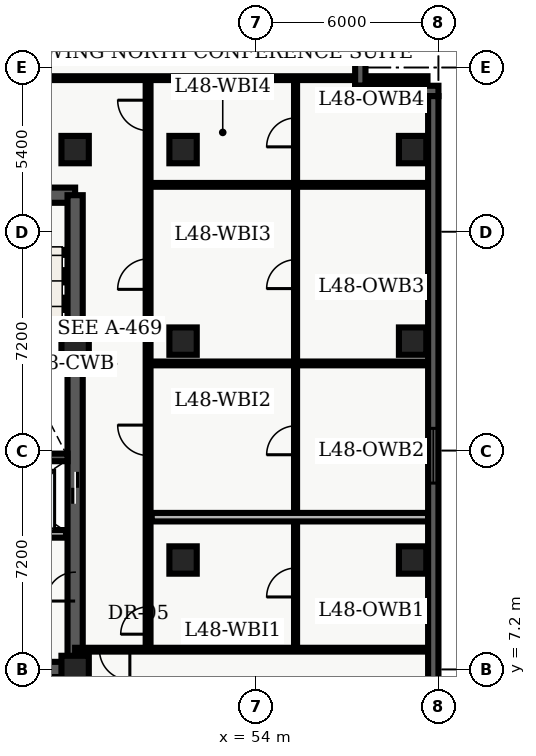
"""IFC4 building model, lengths in metres.
Left out: names, types, materials, properties, quantities, classifications, styles, units other than length and angle.
Written with IfcOpenShell. Run it as: python <this file> out.ifc"""

import sys

from ifc_helpers import new_model, entity, si_unit, converted_unit, direction, frame, origin_with_axes, origin_2d_with_axis, place, context, subcontext, project, spatial, polyline, rectangle, outline, extrude, element, fill, save


model = new_model("IFC4")
c1 = context("Model", 3, precision=1e-05, world=origin_with_axes(), true_north=direction((0.0, 1.0)))
c2 = subcontext(c1, "Body", "Model", "MODEL_VIEW")
j1 = project(units=[si_unit("LENGTHUNIT", "METRE"), converted_unit("PLANEANGLEUNIT", "DEGREE", entity("IfcPlaneAngleMeasure", 0.017), si_unit("PLANEANGLEUNIT", "RADIAN"), dimensions=[0, 0, 0, 0, 0, 0, 0])], contexts=[c1])
p1 = place(None, origin_with_axes())
s1 = spatial("IfcSite", under=j1, at=p1, CompositionType="ELEMENT")
p2 = place(p1, origin_with_axes())
s2 = spatial("IfcBuilding", under=s1, at=p2, CompositionType="ELEMENT")
p3 = place(p2, frame((0.0, 0.0, 196.5), z_axis=(0.0, 0.0, 1.0), x_axis=(1.0, 0.0, 0.0)))
s3 = spatial("IfcBuildingStorey", under=s2, at=p3, CompositionType="ELEMENT", Elevation=196.5)
p4 = place(p3, frame((40.2, 7.2, 0.0), z_axis=(0.0, 0.0, 1.0), x_axis=(1.0, 0.0, 0.0)))
e1 = element("IfcWall", 1, at=p4, inside=s3, PredefinedType="SHEAR", context=c2, shape_type="SweptSolid", body=[
    extrude(outline(polyline([(0.0, -0.25), (7.85, -0.25), (7.85, 0.25), (0.0, 0.25), (0.0, -0.25)])), origin_with_axes(), (0.0, 0.0, 1.0), 3.66),
])
p5 = place(p4, frame((2.175, 0.0, 0.0), z_axis=(0.0, 0.0, 1.0), x_axis=(1.0, 0.0, 0.0)))
e2 = element("IfcOpeningElement", 2, at=p5, cuts=e1, PredefinedType="OPENING", context=c2, shape_type="SweptSolid", body=[
    extrude(rectangle(XDim=1.05, YDim=0.52, at=origin_2d_with_axis()), origin_with_axes(), (0.0, 0.0, 1.0), 2.15),
])
p6 = place(p3, frame((40.2, 22.8, 0.0), z_axis=(0.0, 0.0, 1.0), x_axis=(1.0, 0.0, 0.0)))
e3 = element("IfcWall", 3, at=p6, inside=s3, PredefinedType="SHEAR", context=c2, shape_type="SweptSolid", body=[
    extrude(outline(polyline([(0.0, -0.25), (7.85, -0.25), (7.85, 0.25), (0.0, 0.25), (0.0, -0.25)])), origin_with_axes(), (0.0, 0.0, 1.0), 3.66),
])
p7 = place(p6, frame((5.775, 0.0, 0.0), z_axis=(0.0, 0.0, 1.0), x_axis=(1.0, 0.0, 0.0)))
e4 = element("IfcOpeningElement", 4, at=p7, cuts=e3, PredefinedType="OPENING", context=c2, shape_type="SweptSolid", body=[
    extrude(rectangle(XDim=1.05, YDim=0.52, at=origin_2d_with_axis()), origin_with_axes(), (0.0, 0.0, 1.0), 2.15),
])
p8 = place(p3, frame((48.05, 7.2, 0.0), z_axis=(0.0, 0.0, 1.0), x_axis=(0.0, 1.0, 0.0)))
e5 = element("IfcWall", 5, at=p8, inside=s3, PredefinedType="SHEAR", context=c2, shape_type="SweptSolid", body=[
    extrude(outline(polyline([(0.0, -0.25), (15.6, -0.25), (15.6, 0.25), (0.0, 0.25), (0.0, -0.25)])), origin_with_axes(), (0.0, 0.0, 1.0), 3.66),
])
p9 = place(p8, frame((5.975, 0.0, 0.0), z_axis=(0.0, 0.0, 1.0), x_axis=(1.0, 0.0, 0.0)))
e6 = element("IfcOpeningElement", 6, at=p9, cuts=e5, PredefinedType="OPENING", context=c2, shape_type="SweptSolid", body=[
    extrude(rectangle(XDim=1.05, YDim=0.52, at=origin_2d_with_axis()), origin_with_axes(), (0.0, 0.0, 1.0), 2.15),
])
p10 = place(p8, frame((2.725, 0.0, 0.0), z_axis=(0.0, 0.0, 1.0), x_axis=(1.0, 0.0, 0.0)))
e7 = element("IfcOpeningElement", 7, at=p10, cuts=e5, PredefinedType="OPENING", context=c2, shape_type="SweptSolid", body=[
    extrude(rectangle(XDim=0.95, YDim=0.52, at=origin_2d_with_axis()), origin_with_axes(), (0.0, 0.0, 1.0), 2.15),
])
p11 = place(p3, frame((44.25, 14.175, 0.0), z_axis=(0.0, 0.0, 1.0), x_axis=(1.0, 0.0, 0.0)))
e8 = element("IfcWall", 8, at=p11, inside=s3, PredefinedType="SHEAR", context=c2, shape_type="SweptSolid", body=[
    extrude(outline(polyline([(0.0, -0.125), (3.55, -0.125), (3.55, 0.125), (0.0, 0.125), (0.0, -0.125)])), origin_with_axes(), (0.0, 0.0, 1.0), 3.66),
])
for number, where, z_axis, x_axis in (
    (9, (48.05, 7.2, 0.0), (0.0, 0.0, 1.0), (1.0, 0.0, 0.0)),
    (10, (48.05, 18.0, 0.0), (0.0, 0.0, 1.0), (1.0, 0.0, 0.0)),
    (11, (48.05, 24.3, 0.0), (0.0, 0.0, 1.0), (1.0, 0.0, 0.0)),
    (12, (51.6, 10.8, 0.0), (0.0, 0.0, 1.0), (1.0, 0.0, 0.0)),
    (13, (51.6, 18.0, 0.0), (0.0, 0.0, 1.0), (1.0, 0.0, 0.0)),
    (14, (51.6, 24.3, 0.0), (0.0, 0.0, 1.0), (1.0, 0.0, 0.0)),
    (15, (59.15, 10.8, 0.0), (0.0, 0.0, 1.0), (1.0, 0.0, 0.0)),
    (16, (59.15, 18.0, 0.0), (0.0, 0.0, 1.0), (1.0, 0.0, 0.0)),
    (17, (59.15, 24.3, 0.0), (0.0, 0.0, 1.0), (1.0, 0.0, 0.0)),
):
    element("IfcColumn", number, at=place(p3, frame(where, z_axis=z_axis, x_axis=x_axis)), inside=s3, PredefinedType="COLUMN", context=c2, shape_type="SweptSolid", body=[
        extrude(rectangle(XDim=0.9, YDim=0.9, at=origin_2d_with_axis()), origin_with_axes(), (0.0, 0.0, 1.0), 3.9),
    ])
p12 = place(p3, frame((44.25, 11.66, 0.0), z_axis=(0.0, 0.0, 1.0), x_axis=(1.0, 0.0, 0.0)))
e18 = element("IfcWall", 18, at=p12, inside=s3, PredefinedType="SOLIDWALL", context=c2, shape_type="SweptSolid", body=[
    extrude(outline(polyline([(0.0, -0.125), (3.5, -0.125), (3.5, 0.125), (0.0, 0.125), (0.0, -0.125)])), origin_with_axes(), (0.0, 0.0, 1.0), 2.7),
])
p13 = place(p3, frame((50.45, 7.85, 0.0), z_axis=(0.0, 0.0, 1.0), x_axis=(0.0, 1.0, 0.0)))
e19 = element("IfcWall", 19, at=p13, inside=s3, PredefinedType="PARTITIONING", context=c2, shape_type="SweptSolid", body=[
    extrude(outline(polyline([(0.0, -0.08), (18.8, -0.08), (18.8, 0.08), (0.0, 0.08), (0.0, -0.08)])), origin_with_axes(), (0.0, 0.0, 1.0), 2.7),
])
p14 = place(p13, frame((0.96, 0.0, 0.0), z_axis=(0.0, 0.0, 1.0), x_axis=(1.0, 0.0, 0.0)))
e20 = element("IfcOpeningElement", 20, at=p14, cuts=e19, PredefinedType="OPENING", context=c2, shape_type="SweptSolid", body=[
    extrude(rectangle(XDim=0.9, YDim=0.18, at=origin_2d_with_axis()), origin_with_axes(), (0.0, 0.0, 1.0), 2.15),
])
p15 = place(p13, frame((6.888, 0.0, 0.0), z_axis=(0.0, 0.0, 1.0), x_axis=(1.0, 0.0, 0.0)))
e21 = element("IfcOpeningElement", 21, at=p15, cuts=e19, PredefinedType="OPENING", context=c2, shape_type="SweptSolid", body=[
    extrude(rectangle(XDim=1.0, YDim=0.18, at=origin_2d_with_axis()), origin_with_axes(), (0.0, 0.0, 1.0), 2.15),
])
p16 = place(p13, frame((12.353, 0.0, 0.0), z_axis=(0.0, 0.0, 1.0), x_axis=(1.0, 0.0, 0.0)))
e22 = element("IfcOpeningElement", 22, at=p16, cuts=e19, PredefinedType="OPENING", context=c2, shape_type="SweptSolid", body=[
    extrude(rectangle(XDim=1.0, YDim=0.18, at=origin_2d_with_axis()), origin_with_axes(), (0.0, 0.0, 1.0), 2.15),
])
p17 = place(p13, frame((17.575, 0.0, 0.0), z_axis=(0.0, 0.0, 1.0), x_axis=(1.0, 0.0, 0.0)))
e23 = element("IfcOpeningElement", 23, at=p17, cuts=e19, PredefinedType="OPENING", context=c2, shape_type="SweptSolid", body=[
    extrude(rectangle(XDim=1.0, YDim=0.18, at=origin_2d_with_axis()), origin_with_axes(), (0.0, 0.0, 1.0), 2.15),
])
p18 = place(p3, frame((59.665, 7.85, 0.0), z_axis=(0.0, 0.0, 1.0), x_axis=(-1.0, 0.0, 0.0)))
e24 = element("IfcWall", 24, at=p18, inside=s3, PredefinedType="PARTITIONING", context=c2, shape_type="SweptSolid", body=[
    extrude(outline(polyline([(0.0, -0.062), (11.615, -0.062), (11.615, 0.062), (0.0, 0.062), (0.0, -0.062)])), origin_with_axes(), (0.0, 0.0, 1.0), 2.7),
])
p19 = place(p18, frame((10.315, 0.0, 0.0), z_axis=(0.0, 0.0, 1.0), x_axis=(1.0, 0.0, 0.0)))
e25 = element("IfcOpeningElement", 25, at=p19, cuts=e24, PredefinedType="OPENING", context=c2, shape_type="SweptSolid", body=[
    extrude(rectangle(XDim=1.0, YDim=0.145, at=origin_2d_with_axis()), origin_with_axes(), (0.0, 0.0, 1.0), 2.15),
])
p20 = place(p3, frame((38.735, 26.65, 0.0), z_axis=(0.0, 0.0, 1.0), x_axis=(1.0, 0.0, 0.0)))
e26 = element("IfcWall", 26, at=p20, inside=s3, PredefinedType="PARTITIONING", context=c2, shape_type="SweptSolid", body=[
    extrude(outline(polyline([(0.0, -0.062), (20.905, -0.062), (20.905, 0.062), (0.0, 0.062), (0.0, -0.062)])), origin_with_axes(), (0.0, 0.0, 1.0), 2.7),
])
p21 = place(p20, frame((4.265, 0.0, 0.0), z_axis=(0.0, 0.0, 1.0), x_axis=(1.0, 0.0, 0.0)))
e27 = element("IfcOpeningElement", 27, at=p21, cuts=e26, PredefinedType="OPENING", context=c2, shape_type="SweptSolid", body=[
    extrude(rectangle(XDim=1.0, YDim=0.145, at=origin_2d_with_axis()), origin_with_axes(), (0.0, 0.0, 1.0), 2.15),
])
p22 = place(p3, frame((55.3, 7.98, 0.0), z_axis=(0.0, 0.0, 1.0), x_axis=(0.0, 1.0, 0.0)))
e28 = element("IfcWall", 28, at=p22, inside=s3, PredefinedType="PARTITIONING", context=c2, shape_type="SweptSolid", body=[
    extrude(outline(polyline([(0.0, -0.05), (18.54, -0.05), (18.54, 0.05), (0.0, 0.05), (0.0, -0.05)])), origin_with_axes(), (0.0, 0.0, 1.0), 2.7),
])
p23 = place(p22, frame((2.079, 0.0, 0.0), z_axis=(0.0, 0.0, 1.0), x_axis=(1.0, 0.0, 0.0)))
e29 = element("IfcOpeningElement", 29, at=p23, cuts=e28, PredefinedType="OPENING", context=c2, shape_type="SweptSolid", body=[
    extrude(rectangle(XDim=0.95, YDim=0.12, at=origin_2d_with_axis()), origin_with_axes(), (0.0, 0.0, 1.0), 2.15),
])
p24 = place(p22, frame((6.758, 0.0, 0.0), z_axis=(0.0, 0.0, 1.0), x_axis=(1.0, 0.0, 0.0)))
e30 = element("IfcOpeningElement", 30, at=p24, cuts=e28, PredefinedType="OPENING", context=c2, shape_type="SweptSolid", body=[
    extrude(rectangle(XDim=0.95, YDim=0.12, at=origin_2d_with_axis()), origin_with_axes(), (0.0, 0.0, 1.0), 2.15),
])
p25 = place(p22, frame((12.223, 0.0, 0.0), z_axis=(0.0, 0.0, 1.0), x_axis=(1.0, 0.0, 0.0)))
e31 = element("IfcOpeningElement", 31, at=p25, cuts=e28, PredefinedType="OPENING", context=c2, shape_type="SweptSolid", body=[
    extrude(rectangle(XDim=0.95, YDim=0.12, at=origin_2d_with_axis()), origin_with_axes(), (0.0, 0.0, 1.0), 2.15),
])
p26 = place(p22, frame((16.885, 0.0, 0.0), z_axis=(0.0, 0.0, 1.0), x_axis=(1.0, 0.0, 0.0)))
e32 = element("IfcOpeningElement", 32, at=p26, cuts=e28, PredefinedType="OPENING", context=c2, shape_type="SweptSolid", body=[
    extrude(rectangle(XDim=0.95, YDim=0.12, at=origin_2d_with_axis()), origin_with_axes(), (0.0, 0.0, 1.0), 2.15),
])
p27 = place(p3, frame((50.57, 12.209, 0.0), z_axis=(0.0, 0.0, 1.0), x_axis=(1.0, 0.0, 0.0)))
e33 = element("IfcWall", 33, at=p27, inside=s3, PredefinedType="PARTITIONING", context=c2, shape_type="SweptSolid", body=[
    extrude(outline(polyline([(0.0, -0.14), (9.095, -0.14), (9.095, 0.14), (0.0, 0.14), (0.0, -0.14)])), origin_with_axes(), (0.0, 0.0, 1.0), 2.7),
])
for number, where, z_axis, x_axis in (
    (34, (50.57, 17.266, 0.0), (0.0, 0.0, 1.0), (1.0, 0.0, 0.0)),
    (35, (50.57, 23.14, 0.0), (0.0, 0.0, 1.0), (1.0, 0.0, 0.0)),
):
    element("IfcWall", number, at=place(p3, frame(where, z_axis=z_axis, x_axis=x_axis)), inside=s3, PredefinedType="PARTITIONING", context=c2, shape_type="SweptSolid", body=[
        extrude(outline(polyline([(0.0, -0.062), (9.095, -0.062), (9.095, 0.062), (0.0, 0.062), (0.0, -0.062)])), origin_with_axes(), (0.0, 0.0, 1.0), 2.7),
    ])
p28 = place(p3, frame((57.43, 28.46, 0.0), z_axis=(0.0, 0.0, 1.0), x_axis=(0.0, -1.0, 0.0)))
e36 = element("IfcWall", 36, at=p28, inside=s3, PredefinedType="SOLIDWALL", context=c2, shape_type="SweptSolid", body=[
    extrude(outline(polyline([(0.0, -0.17), (2.06, -0.17), (2.06, 0.17), (0.0, 0.17), (0.0, -0.17)])), origin_with_axes(), (0.0, 0.0, 1.0), 3.66),
])
p29 = place(p3, frame((57.26, 26.23, 0.0), z_axis=(0.0, 0.0, 1.0), x_axis=(1.0, 0.0, 0.0)))
e37 = element("IfcWall", 37, at=p29, inside=s3, PredefinedType="SOLIDWALL", context=c2, shape_type="SweptSolid", body=[
    extrude(outline(polyline([(0.0, -0.17), (2.74, -0.17), (2.74, 0.17), (0.0, 0.17), (0.0, -0.17)])), origin_with_axes(), (0.0, 0.0, 1.0), 3.66),
])
p30 = place(p3, frame((59.83, 26.06, 0.0), z_axis=(0.0, 0.0, 1.0), x_axis=(0.0, -1.0, 0.0)))
e38 = element("IfcWall", 38, at=p30, inside=s3, PredefinedType="SOLIDWALL", context=c2, shape_type="SweptSolid", body=[
    extrude(outline(polyline([(0.0, -0.17), (23.66, -0.17), (23.66, 0.17), (0.0, 0.17), (0.0, -0.17)])), origin_with_axes(), (0.0, 0.0, 1.0), 3.66),
])
p31 = place(p30, frame((11.83, 0.0, 0.45), z_axis=(0.0, 0.0, 1.0), x_axis=(1.0, 0.0, 0.0)))
e39 = element("IfcOpeningElement", 39, at=p31, cuts=e38, PredefinedType="OPENING", context=c2, shape_type="SweptSolid", body=[
    extrude(rectangle(XDim=1.8, YDim=0.36, at=origin_2d_with_axis()), origin_with_axes(), (0.0, 0.0, 1.0), 2.1),
])
p32 = place(p30, frame((20.364, 0.0, 0.45), z_axis=(0.0, 0.0, 1.0), x_axis=(1.0, 0.0, 0.0)))
e40 = element("IfcOpeningElement", 40, at=p32, cuts=e38, PredefinedType="OPENING", context=c2, shape_type="SweptSolid", body=[
    extrude(rectangle(XDim=1.8, YDim=0.36, at=origin_2d_with_axis()), origin_with_axes(), (0.0, 0.0, 1.0), 2.1),
])
p33 = place(p8, frame((5.975, 0.0, 0.0), z_axis=(0.0, 0.0, 1.0), x_axis=(1.0, 0.0, 0.0)))
e41 = element("IfcDoor", 41, at=p33, inside=s3, OperationType="SLIDING_TO_LEFT", PredefinedType="DOOR", context=c2, shape_type="SweptSolid", body=[
    extrude(rectangle(XDim=1.05, YDim=0.09, at=origin_2d_with_axis()), origin_with_axes(), (0.0, 0.0, 1.0), 2.15),
])
fill(e6, e41)
p34 = place(p8, frame((2.725, 0.0, 0.0), z_axis=(0.0, 0.0, 1.0), x_axis=(1.0, 0.0, 0.0)))
e42 = element("IfcDoor", 42, at=p34, inside=s3, OperationType="SINGLE_SWING_LEFT", PredefinedType="DOOR", context=c2, shape_type="SweptSolid", body=[
    extrude(rectangle(XDim=0.95, YDim=0.09, at=origin_2d_with_axis()), origin_with_axes(), (0.0, 0.0, 1.0), 2.15),
])
fill(e7, e42)
p35 = place(p18, frame((10.315, 0.0, 0.0), z_axis=(0.0, 0.0, 1.0), x_axis=(1.0, 0.0, 0.0)))
e43 = element("IfcDoor", 43, at=p35, inside=s3, OperationType="SINGLE_SWING_LEFT", PredefinedType="DOOR", context=c2, shape_type="SweptSolid", body=[
    extrude(rectangle(XDim=1.0, YDim=0.075, at=origin_2d_with_axis()), origin_with_axes(), (0.0, 0.0, 1.0), 2.15),
])
fill(e25, e43)
p36 = place(p22, frame((2.079, 0.0, 0.0), z_axis=(0.0, 0.0, 1.0), x_axis=(1.0, 0.0, 0.0)))
e44 = element("IfcDoor", 44, at=p36, inside=s3, OperationType="SINGLE_SWING_LEFT", PredefinedType="DOOR", context=c2, shape_type="SweptSolid", body=[
    extrude(rectangle(XDim=0.95, YDim=0.06, at=origin_2d_with_axis()), origin_with_axes(), (0.0, 0.0, 1.0), 2.15),
])
fill(e29, e44)
p37 = place(p13, frame((0.96, 0.0, 0.0), z_axis=(0.0, 0.0, 1.0), x_axis=(1.0, 0.0, 0.0)))
e45 = element("IfcDoor", 45, at=p37, inside=s3, OperationType="SINGLE_SWING_LEFT", PredefinedType="DOOR", context=c2, shape_type="SweptSolid", body=[
    extrude(rectangle(XDim=0.9, YDim=0.09, at=origin_2d_with_axis()), origin_with_axes(), (0.0, 0.0, 1.0), 2.15),
])
fill(e20, e45)
p38 = place(p22, frame((6.758, 0.0, 0.0), z_axis=(0.0, 0.0, 1.0), x_axis=(1.0, 0.0, 0.0)))
e46 = element("IfcDoor", 46, at=p38, inside=s3, OperationType="SINGLE_SWING_LEFT", PredefinedType="DOOR", context=c2, shape_type="SweptSolid", body=[
    extrude(rectangle(XDim=0.95, YDim=0.06, at=origin_2d_with_axis()), origin_with_axes(), (0.0, 0.0, 1.0), 2.15),
])
fill(e30, e46)
p39 = place(p13, frame((6.888, 0.0, 0.0), z_axis=(0.0, 0.0, 1.0), x_axis=(1.0, 0.0, 0.0)))
e47 = element("IfcDoor", 47, at=p39, inside=s3, OperationType="SINGLE_SWING_RIGHT", PredefinedType="DOOR", context=c2, shape_type="SweptSolid", body=[
    extrude(rectangle(XDim=1.0, YDim=0.09, at=origin_2d_with_axis()), origin_with_axes(), (0.0, 0.0, 1.0), 2.15),
])
fill(e21, e47)
p40 = place(p22, frame((12.223, 0.0, 0.0), z_axis=(0.0, 0.0, 1.0), x_axis=(1.0, 0.0, 0.0)))
e48 = element("IfcDoor", 48, at=p40, inside=s3, OperationType="SINGLE_SWING_LEFT", PredefinedType="DOOR", context=c2, shape_type="SweptSolid", body=[
    extrude(rectangle(XDim=0.95, YDim=0.06, at=origin_2d_with_axis()), origin_with_axes(), (0.0, 0.0, 1.0), 2.15),
])
fill(e31, e48)
p41 = place(p13, frame((12.353, 0.0, 0.0), z_axis=(0.0, 0.0, 1.0), x_axis=(1.0, 0.0, 0.0)))
e49 = element("IfcDoor", 49, at=p41, inside=s3, OperationType="SINGLE_SWING_LEFT", PredefinedType="DOOR", context=c2, shape_type="SweptSolid", body=[
    extrude(rectangle(XDim=1.0, YDim=0.09, at=origin_2d_with_axis()), origin_with_axes(), (0.0, 0.0, 1.0), 2.15),
])
fill(e22, e49)
p42 = place(p22, frame((16.885, 0.0, 0.0), z_axis=(0.0, 0.0, 1.0), x_axis=(1.0, 0.0, 0.0)))
e50 = element("IfcDoor", 50, at=p42, inside=s3, OperationType="SINGLE_SWING_LEFT", PredefinedType="DOOR", context=c2, shape_type="SweptSolid", body=[
    extrude(rectangle(XDim=0.95, YDim=0.06, at=origin_2d_with_axis()), origin_with_axes(), (0.0, 0.0, 1.0), 2.15),
])
fill(e32, e50)
p43 = place(p13, frame((17.575, 0.0, 0.0), z_axis=(0.0, 0.0, 1.0), x_axis=(1.0, 0.0, 0.0)))
e51 = element("IfcDoor", 51, at=p43, inside=s3, OperationType="SINGLE_SWING_RIGHT", PredefinedType="DOOR", context=c2, shape_type="SweptSolid", body=[
    extrude(rectangle(XDim=1.0, YDim=0.09, at=origin_2d_with_axis()), origin_with_axes(), (0.0, 0.0, 1.0), 2.15),
])
fill(e23, e51)
p44 = place(p30, frame((11.83, 0.0, 0.45), z_axis=(0.0, 0.0, 1.0), x_axis=(1.0, 0.0, 0.0)))
e52 = element("IfcWindow", 52, at=p44, inside=s3, PredefinedType="WINDOW", context=c2, shape_type="SweptSolid", body=[
    extrude(rectangle(XDim=1.8, YDim=0.09, at=origin_2d_with_axis()), origin_with_axes(), (0.0, 0.0, 1.0), 2.1),
])
fill(e39, e52)
save(model, sys.argv[1])
